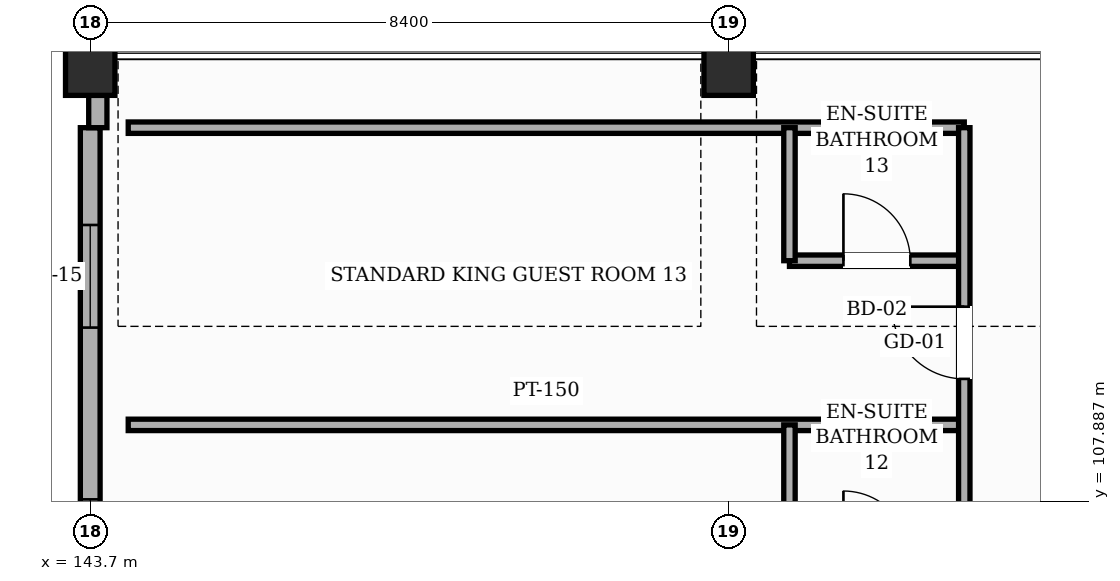
"""IFC4 building model, lengths in metres.
Left out: names, types, materials, properties, quantities, classifications, styles, units other than length and angle.
Written with IfcOpenShell. Run it as: python <this file> out.ifc"""

import sys

from ifc_helpers import new_model, si_unit, direction, frame, frame_2d, origin, origin_2d, place, context, subcontext, project, spatial, rectangle, hollow_rectangle, extrude, element, fill, save


model = new_model("IFC4")
c1 = context("Model", 3, precision=1e-05, world=origin(), true_north=direction((0.0, 1.0)))
c2 = subcontext(c1, "Body", "Model", "MODEL_VIEW")
j1 = project(units=[si_unit("LENGTHUNIT", "METRE"), si_unit("PLANEANGLEUNIT", "RADIAN")], contexts=[c1])
p1 = place(None, origin())
s1 = spatial("IfcSite", under=j1, at=p1, CompositionType="ELEMENT")
p2 = place(p1, origin())
s2 = spatial("IfcBuilding", under=s1, at=p2, CompositionType="ELEMENT")
p3 = place(p2, frame((0.0, 0.0, 15.0)))
s3 = spatial("IfcBuildingStorey", under=s2, at=p3, CompositionType="ELEMENT", Elevation=15.0)
for number, where, z_axis, x_axis in (
    (1, (143.7, 113.55, 0.0), (0.0, 0.0, 1.0), (1.0, 0.0, 0.0)),
    (2, (152.1, 113.55, 0.0), (0.0, 0.0, 1.0), (1.0, 0.0, 0.0)),
):
    element("IfcColumn", number, at=place(p3, frame(where, z_axis=z_axis, x_axis=x_axis)), inside=s3, PredefinedType="COLUMN", context=c2, shape_type="SweptSolid", body=[
        extrude(hollow_rectangle(XDim=0.65, YDim=0.65, WallThickness=0.025, InnerFilletRadius=0.025, OuterFilletRadius=0.05, at=origin_2d()), origin(), (0.0, 0.0, 1.0), 4.8),
    ])
p4 = place(p3, frame((143.7, 105.775, 0.0), z_axis=(0.0, 0.0, 1.0), x_axis=(0.0, 1.0, 0.0)))
e3 = element("IfcWall", 3, at=p4, inside=s3, PredefinedType="SOLIDWALL", context=c2, shape_type="SweptSolid", body=[
    extrude(rectangle(XDim=7.025, YDim=0.26, at=frame_2d((3.513, 0.0))), origin(), (0.0, 0.0, 1.0), 3.985),
])
p5 = place(p4, frame((0.985, 0.0, 0.85)))
e4 = element("IfcOpeningElement", 4, at=p5, cuts=e3, PredefinedType="OPENING", context=c2, shape_type="SweptSolid", body=[
    extrude(rectangle(XDim=1.15, YDim=1.95, at=frame_2d((0.575, 0.975))), frame((0.0, 0.14, 0.0), z_axis=(0.0, -1.0, 0.0), x_axis=(1.0, 0.0, 0.0)), (0.0, 0.0, 1.0), 0.28),
])
p6 = place(p4, frame((4.395, 0.0, 0.85)))
e5 = element("IfcOpeningElement", 5, at=p6, cuts=e3, PredefinedType="OPENING", context=c2, shape_type="SweptSolid", body=[
    extrude(rectangle(XDim=1.35, YDim=1.95, at=frame_2d((0.675, 0.975))), frame((0.0, 0.14, 0.0), z_axis=(0.0, -1.0, 0.0), x_axis=(1.0, 0.0, 0.0)), (0.0, 0.0, 1.0), 0.28),
])
p7 = place(p3, frame((143.8, 112.8, 0.0), z_axis=(0.0, 0.0, 1.0), x_axis=(0.0, 1.0, 0.0)))
e6 = element("IfcWall", 6, at=p7, inside=s3, PredefinedType="SOLIDWALL", context=c2, shape_type="SweptSolid", body=[
    extrude(rectangle(XDim=0.425, YDim=0.24, at=frame_2d((0.212, 0.0))), origin(), (0.0, 0.0, 1.0), 3.985),
])
p8 = place(p3, frame((143.8, 113.64, 0.0), z_axis=(0.0, 0.0, 1.0), x_axis=(0.0, 1.0, 0.0)))
e7 = element("IfcWall", 7, at=p8, inside=s3, PredefinedType="SOLIDWALL", context=c2, shape_type="SweptSolid", body=[
    extrude(rectangle(XDim=0.36, YDim=0.24, at=frame_2d((0.18, 0.0))), origin(), (0.0, 0.0, 1.0), 4.545),
])
p9 = place(p3, frame((144.2, 108.89, 0.0), z_axis=(0.0, 0.0, 1.0), x_axis=(1.0, 0.0, 0.0)))
e8 = element("IfcWall", 8, at=p9, inside=s3, PredefinedType="PARTITIONING", context=c2, shape_type="SweptSolid", body=[
    extrude(rectangle(XDim=11.0, YDim=0.15, at=frame_2d((5.5, 0.0))), origin(), (0.0, 0.0, 1.0), 4.545),
])
p10 = place(p3, frame((152.9, 111.05, 0.0), z_axis=(0.0, 0.0, 1.0), x_axis=(1.0, 0.0, 0.0)))
e9 = element("IfcWall", 9, at=p10, inside=s3, PredefinedType="PARTITIONING", context=c2, shape_type="SweptSolid", body=[
    extrude(rectangle(XDim=2.3, YDim=0.15, at=frame_2d((1.15, 0.0))), origin(), (0.0, 0.0, 1.0), 4.545),
])
p11 = place(p10, frame((0.71, 0.0, 0.0)))
e10 = element("IfcOpeningElement", 10, at=p11, cuts=e9, PredefinedType="OPENING", context=c2, shape_type="SweptSolid", body=[
    extrude(rectangle(XDim=0.88, YDim=2.12, at=frame_2d((0.44, 1.06))), frame((0.0, 0.085, 0.0), z_axis=(0.0, -1.0, 0.0), x_axis=(1.0, 0.0, 0.0)), (0.0, 0.0, 1.0), 0.17),
])
p12 = place(p3, frame((144.2, 112.8, 0.0), z_axis=(0.0, 0.0, 1.0), x_axis=(1.0, 0.0, 0.0)))
e11 = element("IfcWall", 11, at=p12, inside=s3, PredefinedType="PARTITIONING", context=c2, shape_type="SweptSolid", body=[
    extrude(rectangle(XDim=11.0, YDim=0.15, at=frame_2d((5.5, 0.0))), origin(), (0.0, 0.0, 1.0), 4.545),
])
for number, where, z_axis, x_axis in (
    (12, (152.9, 107.14, 0.0), (0.0, 0.0, 1.0), (0.0, 1.0, 0.0)),
    (13, (152.9, 111.05, 0.0), (0.0, 0.0, 1.0), (0.0, 1.0, 0.0)),
):
    element("IfcWall", number, at=place(p3, frame(where, z_axis=z_axis, x_axis=x_axis)), inside=s3, PredefinedType="PARTITIONING", context=c2, shape_type="SweptSolid", body=[
        extrude(rectangle(XDim=1.75, YDim=0.15, at=frame_2d((0.875, 0.0))), origin(), (0.0, 0.0, 1.0), 4.545),
    ])
p13 = place(p3, frame((155.2, 62.0, 0.0), z_axis=(0.0, 0.0, 1.0), x_axis=(0.0, 1.0, 0.0)))
e14 = element("IfcWall", 14, at=p13, inside=s3, PredefinedType="PARTITIONING", context=c2, shape_type="SweptSolid", body=[
    extrude(rectangle(XDim=50.8, YDim=0.15, at=frame_2d((25.4, 0.0))), origin(), (0.0, 0.0, 1.0), 4.545),
])
p14 = place(p13, frame((0.53, 0.0, 0.0)))
e15 = element("IfcOpeningElement", 15, at=p14, cuts=e14, PredefinedType="OPENING", context=c2, shape_type="SweptSolid", body=[
    extrude(rectangle(XDim=1.1, YDim=2.2, at=frame_2d((0.55, 1.1))), frame((0.0, 0.085, 0.0), z_axis=(0.0, -1.0, 0.0), x_axis=(1.0, 0.0, 0.0)), (0.0, 0.0, 1.0), 0.17),
])
p15 = place(p13, frame((4.51, 0.0, 0.0)))
e16 = element("IfcOpeningElement", 16, at=p15, cuts=e14, PredefinedType="OPENING", context=c2, shape_type="SweptSolid", body=[
    extrude(rectangle(XDim=0.95, YDim=2.15, at=frame_2d((0.475, 1.075))), frame((0.0, 0.085, 0.0), z_axis=(0.0, -1.0, 0.0), x_axis=(1.0, 0.0, 0.0)), (0.0, 0.0, 1.0), 0.17),
])
p16 = place(p13, frame((8.42, 0.0, 0.0)))
e17 = element("IfcOpeningElement", 17, at=p16, cuts=e14, PredefinedType="OPENING", context=c2, shape_type="SweptSolid", body=[
    extrude(rectangle(XDim=0.95, YDim=2.15, at=frame_2d((0.475, 1.075))), frame((0.0, 0.085, 0.0), z_axis=(0.0, -1.0, 0.0), x_axis=(1.0, 0.0, 0.0)), (0.0, 0.0, 1.0), 0.17),
])
p17 = place(p13, frame((12.33, 0.0, 0.0)))
e18 = element("IfcOpeningElement", 18, at=p17, cuts=e14, PredefinedType="OPENING", context=c2, shape_type="SweptSolid", body=[
    extrude(rectangle(XDim=0.95, YDim=2.15, at=frame_2d((0.475, 1.075))), frame((0.0, 0.085, 0.0), z_axis=(0.0, -1.0, 0.0), x_axis=(1.0, 0.0, 0.0)), (0.0, 0.0, 1.0), 0.17),
])
p18 = place(p13, frame((16.235, 0.0, 0.0)))
e19 = element("IfcOpeningElement", 19, at=p18, cuts=e14, PredefinedType="OPENING", context=c2, shape_type="SweptSolid", body=[
    extrude(rectangle(XDim=0.95, YDim=2.15, at=frame_2d((0.475, 1.075))), frame((0.0, 0.085, 0.0), z_axis=(0.0, -1.0, 0.0), x_axis=(1.0, 0.0, 0.0)), (0.0, 0.0, 1.0), 0.17),
])
p19 = place(p13, frame((20.145, 0.0, 0.0)))
e20 = element("IfcOpeningElement", 20, at=p19, cuts=e14, PredefinedType="OPENING", context=c2, shape_type="SweptSolid", body=[
    extrude(rectangle(XDim=0.95, YDim=2.15, at=frame_2d((0.475, 1.075))), frame((0.0, 0.085, 0.0), z_axis=(0.0, -1.0, 0.0), x_axis=(1.0, 0.0, 0.0)), (0.0, 0.0, 1.0), 0.17),
])
p20 = place(p13, frame((24.05, 0.0, 0.0)))
e21 = element("IfcOpeningElement", 21, at=p20, cuts=e14, PredefinedType="OPENING", context=c2, shape_type="SweptSolid", body=[
    extrude(rectangle(XDim=0.95, YDim=2.15, at=frame_2d((0.475, 1.075))), frame((0.0, 0.085, 0.0), z_axis=(0.0, -1.0, 0.0), x_axis=(1.0, 0.0, 0.0)), (0.0, 0.0, 1.0), 0.17),
])
p21 = place(p13, frame((27.96, 0.0, 0.0)))
e22 = element("IfcOpeningElement", 22, at=p21, cuts=e14, PredefinedType="OPENING", context=c2, shape_type="SweptSolid", body=[
    extrude(rectangle(XDim=0.95, YDim=2.15, at=frame_2d((0.475, 1.075))), frame((0.0, 0.085, 0.0), z_axis=(0.0, -1.0, 0.0), x_axis=(1.0, 0.0, 0.0)), (0.0, 0.0, 1.0), 0.17),
])
p22 = place(p13, frame((31.865, 0.0, 0.0)))
e23 = element("IfcOpeningElement", 23, at=p22, cuts=e14, PredefinedType="OPENING", context=c2, shape_type="SweptSolid", body=[
    extrude(rectangle(XDim=0.95, YDim=2.15, at=frame_2d((0.475, 1.075))), frame((0.0, 0.085, 0.0), z_axis=(0.0, -1.0, 0.0), x_axis=(1.0, 0.0, 0.0)), (0.0, 0.0, 1.0), 0.17),
])
p23 = place(p13, frame((35.77, 0.0, 0.0)))
e24 = element("IfcOpeningElement", 24, at=p23, cuts=e14, PredefinedType="OPENING", context=c2, shape_type="SweptSolid", body=[
    extrude(rectangle(XDim=0.95, YDim=2.15, at=frame_2d((0.475, 1.075))), frame((0.0, 0.085, 0.0), z_axis=(0.0, -1.0, 0.0), x_axis=(1.0, 0.0, 0.0)), (0.0, 0.0, 1.0), 0.17),
])
p24 = place(p13, frame((39.68, 0.0, 0.0)))
e25 = element("IfcOpeningElement", 25, at=p24, cuts=e14, PredefinedType="OPENING", context=c2, shape_type="SweptSolid", body=[
    extrude(rectangle(XDim=0.95, YDim=2.15, at=frame_2d((0.475, 1.075))), frame((0.0, 0.085, 0.0), z_axis=(0.0, -1.0, 0.0), x_axis=(1.0, 0.0, 0.0)), (0.0, 0.0, 1.0), 0.17),
])
p25 = place(p13, frame((43.59, 0.0, 0.0)))
e26 = element("IfcOpeningElement", 26, at=p25, cuts=e14, PredefinedType="OPENING", context=c2, shape_type="SweptSolid", body=[
    extrude(rectangle(XDim=0.95, YDim=2.15, at=frame_2d((0.475, 1.075))), frame((0.0, 0.085, 0.0), z_axis=(0.0, -1.0, 0.0), x_axis=(1.0, 0.0, 0.0)), (0.0, 0.0, 1.0), 0.17),
])
p26 = place(p13, frame((47.495, 0.0, 0.0)))
e27 = element("IfcOpeningElement", 27, at=p26, cuts=e14, PredefinedType="OPENING", context=c2, shape_type="SweptSolid", body=[
    extrude(rectangle(XDim=0.95, YDim=2.15, at=frame_2d((0.475, 1.075))), frame((0.0, 0.085, 0.0), z_axis=(0.0, -1.0, 0.0), x_axis=(1.0, 0.0, 0.0)), (0.0, 0.0, 1.0), 0.17),
])
p27 = place(p5, origin())
e28 = element("IfcWindow", 28, at=p27, inside=s3, PartitioningType="SINGLE_PANEL", PredefinedType="WINDOW", context=c2, shape_type="SweptSolid", body=[
    extrude(rectangle(XDim=1.15, YDim=1.95, at=frame_2d((0.575, 0.975))), frame((0.0, 0.03, 0.0), z_axis=(0.0, -1.0, 0.0), x_axis=(1.0, 0.0, 0.0)), (0.0, 0.0, 1.0), 0.06),
])
fill(e4, e28)
p28 = place(p6, origin())
e29 = element("IfcWindow", 29, at=p28, inside=s3, PartitioningType="SINGLE_PANEL", PredefinedType="WINDOW", context=c2, shape_type="SweptSolid", body=[
    extrude(rectangle(XDim=1.35, YDim=1.95, at=frame_2d((0.675, 0.975))), frame((0.0, 0.03, 0.0), z_axis=(0.0, -1.0, 0.0), x_axis=(1.0, 0.0, 0.0)), (0.0, 0.0, 1.0), 0.06),
])
fill(e5, e29)
p29 = place(p26, origin())
e30 = element("IfcDoor", 30, at=p29, inside=s3, OperationType="SINGLE_SWING_RIGHT", PredefinedType="DOOR", context=c2, shape_type="SweptSolid", body=[
    extrude(rectangle(XDim=0.95, YDim=2.15, at=frame_2d((0.475, 1.075))), frame((0.0, 0.025, 0.0), z_axis=(0.0, -1.0, 0.0), x_axis=(1.0, 0.0, 0.0)), (0.0, 0.0, 1.0), 0.05),
])
fill(e27, e30)
p30 = place(p11, origin())
e31 = element("IfcDoor", 31, at=p30, inside=s3, OperationType="SINGLE_SWING_LEFT", PredefinedType="DOOR", context=c2, shape_type="SweptSolid", body=[
    extrude(rectangle(XDim=0.88, YDim=2.12, at=frame_2d((0.44, 1.06))), frame((0.0, 0.025, 0.0), z_axis=(0.0, -1.0, 0.0), x_axis=(1.0, 0.0, 0.0)), (0.0, 0.0, 1.0), 0.05),
])
fill(e10, e31)
save(model, sys.argv[1])
